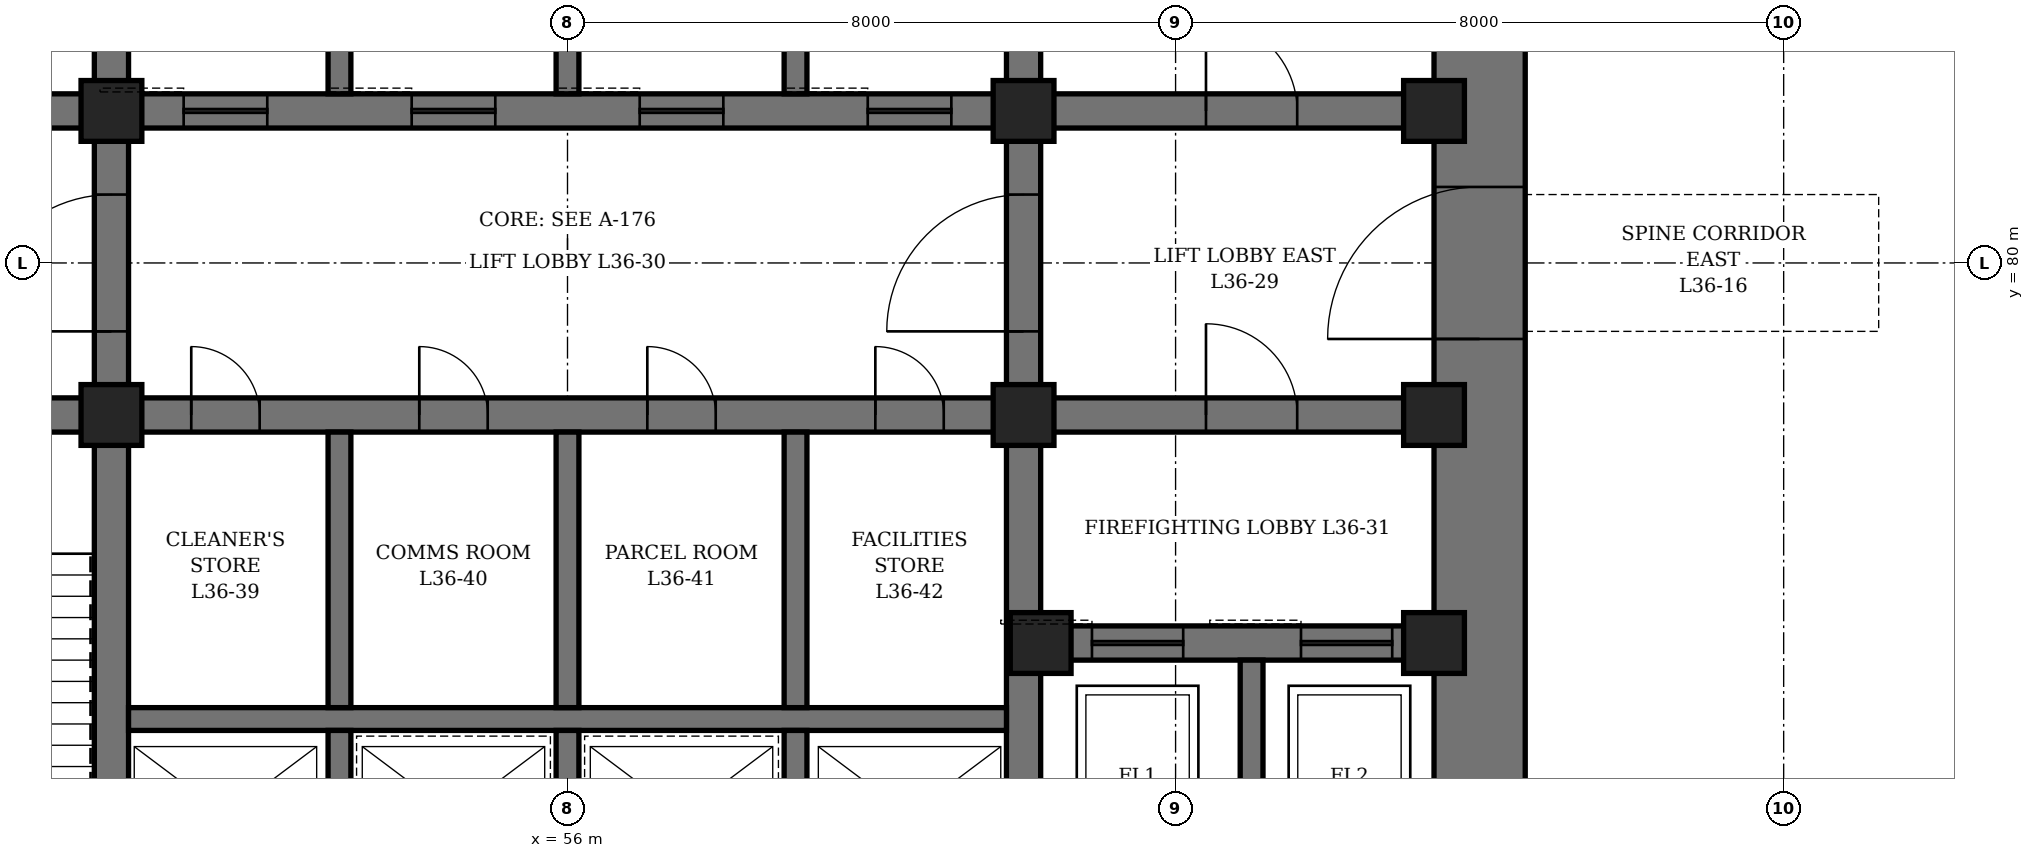
"""IFC4 building model, lengths in metres.
Left out: names, types, materials, properties, quantities, classifications, styles, units other than length and angle.
Written with IfcOpenShell. Run it as: python <this file> out.ifc"""

import sys

from ifc_helpers import new_model, si_unit, direction, frame, frame_2d, origin, origin_2d, place, context, subcontext, project, spatial, rectangle, hollow_rectangle, extrude, element, fill, save


model = new_model("IFC4")
c1 = context("Model", 3, precision=1e-05, world=origin(), true_north=direction((0.0, 1.0)))
c2 = subcontext(c1, "Body", "Model", "MODEL_VIEW")
j1 = project(units=[si_unit("LENGTHUNIT", "METRE"), si_unit("PLANEANGLEUNIT", "RADIAN")], contexts=[c1])
p1 = place(None, origin())
s1 = spatial("IfcSite", under=j1, at=p1, CompositionType="ELEMENT")
p2 = place(p1, origin())
s2 = spatial("IfcBuilding", under=s1, at=p2, CompositionType="ELEMENT")
p3 = place(p2, frame((0.0, 0.0, 162.7)))
s3 = spatial("IfcBuildingStorey", under=s2, at=p3, CompositionType="ELEMENT", Elevation=162.7)
p4 = place(p3, frame((68.0, 70.4, 0.0), z_axis=(0.0, 0.0, 1.0), x_axis=(0.0, 1.0, 0.0)))
e1 = element("IfcWall", 1, at=p4, inside=s3, PredefinedType="SHEAR", context=c2, shape_type="SweptSolid", body=[
    extrude(rectangle(XDim=19.2, YDim=1.2, at=frame_2d((9.6, 0.0))), origin(), (0.0, 0.0, 1.0), 4.2),
])
p5 = place(p4, frame((8.6, 0.0, 0.0)))
e2 = element("IfcOpeningElement", 2, at=p5, cuts=e1, PredefinedType="OPENING", context=c2, shape_type="SweptSolid", body=[
    extrude(rectangle(XDim=2.0, YDim=2.4, at=frame_2d((1.0, 1.2))), frame((0.0, 0.61, 0.0), z_axis=(0.0, -1.0, 0.0), x_axis=(1.0, 0.0, 0.0)), (0.0, 0.0, 1.0), 1.22),
])
p6 = place(p3, frame((50.0, 71.6, 0.0), z_axis=(0.0, 0.0, 1.0), x_axis=(0.0, 1.0, 0.0)))
e3 = element("IfcWall", 3, at=p6, inside=s3, PredefinedType="SHEAR", context=c2, shape_type="SweptSolid", body=[
    extrude(rectangle(XDim=16.8, YDim=0.45, at=frame_2d((8.4, 0.0))), origin(), (0.0, 0.0, 1.0), 4.2),
])
p7 = place(p6, frame((7.5, 0.0, 0.0)))
e4 = element("IfcOpeningElement", 4, at=p7, cuts=e3, PredefinedType="OPENING", context=c2, shape_type="SweptSolid", body=[
    extrude(rectangle(XDim=1.8, YDim=2.4, at=frame_2d((0.9, 1.2))), frame((0.0, 0.235, 0.0), z_axis=(0.0, -1.0, 0.0), x_axis=(1.0, 0.0, 0.0)), (0.0, 0.0, 1.0), 0.47),
])
p8 = place(p3, frame((62.0, 71.6, 0.0), z_axis=(0.0, 0.0, 1.0), x_axis=(0.0, 1.0, 0.0)))
e5 = element("IfcWall", 5, at=p8, inside=s3, PredefinedType="SHEAR", context=c2, shape_type="SweptSolid", body=[
    extrude(rectangle(XDim=16.8, YDim=0.45, at=frame_2d((8.4, 0.0))), origin(), (0.0, 0.0, 1.0), 4.2),
])
p9 = place(p8, frame((7.5, 0.0, 0.0)))
e6 = element("IfcOpeningElement", 6, at=p9, cuts=e5, PredefinedType="OPENING", context=c2, shape_type="SweptSolid", body=[
    extrude(rectangle(XDim=1.8, YDim=2.4, at=frame_2d((0.9, 1.2))), frame((0.0, 0.235, 0.0), z_axis=(0.0, -1.0, 0.0), x_axis=(1.0, 0.0, 0.0)), (0.0, 0.0, 1.0), 0.47),
])
p10 = place(p3, frame((44.6, 78.0, 0.0), z_axis=(0.0, 0.0, 1.0), x_axis=(1.0, 0.0, 0.0)))
e7 = element("IfcWall", 7, at=p10, inside=s3, PredefinedType="SHEAR", context=c2, shape_type="SweptSolid", body=[
    extrude(rectangle(XDim=5.175, YDim=0.45, at=frame_2d((2.587, 0.0))), origin(), (0.0, 0.0, 1.0), 4.2),
])
p11 = place(p10, frame((1.8, 0.0, 0.0)))
e8 = element("IfcOpeningElement", 8, at=p11, cuts=e7, PredefinedType="OPENING", context=c2, shape_type="SweptSolid", body=[
    extrude(rectangle(XDim=1.2, YDim=2.1, at=frame_2d((0.6, 1.05))), frame((0.0, 0.235, 0.0), z_axis=(0.0, -1.0, 0.0), x_axis=(1.0, 0.0, 0.0)), (0.0, 0.0, 1.0), 0.47),
])
p12 = place(p3, frame((44.6, 82.0, 0.0), z_axis=(0.0, 0.0, 1.0), x_axis=(1.0, 0.0, 0.0)))
e9 = element("IfcWall", 9, at=p12, inside=s3, PredefinedType="SHEAR", context=c2, shape_type="SweptSolid", body=[
    extrude(rectangle(XDim=5.175, YDim=0.45, at=frame_2d((2.587, 0.0))), origin(), (0.0, 0.0, 1.0), 4.2),
])
p13 = place(p12, frame((0.7, 0.0, 0.0)))
e10 = element("IfcOpeningElement", 10, at=p13, cuts=e9, PredefinedType="OPENING", context=c2, shape_type="SweptSolid", body=[
    extrude(rectangle(XDim=0.9, YDim=2.1, at=frame_2d((0.45, 1.05))), frame((0.0, 0.235, 0.0), z_axis=(0.0, -1.0, 0.0), x_axis=(1.0, 0.0, 0.0)), (0.0, 0.0, 1.0), 0.47),
])
p14 = place(p3, frame((62.225, 75.0, 0.0), z_axis=(0.0, 0.0, 1.0), x_axis=(1.0, 0.0, 0.0)))
e11 = element("IfcWall", 11, at=p14, inside=s3, PredefinedType="SHEAR", context=c2, shape_type="SweptSolid", body=[
    extrude(rectangle(XDim=5.175, YDim=0.45, at=frame_2d((2.587, 0.0))), origin(), (0.0, 0.0, 1.0), 4.2),
])
p15 = place(p14, frame((0.675, 0.0, 0.0)))
e12 = element("IfcOpeningElement", 12, at=p15, cuts=e11, PredefinedType="OPENING", context=c2, shape_type="SweptSolid", body=[
    extrude(rectangle(XDim=1.2, YDim=2.2, at=frame_2d((0.6, 1.1))), frame((0.0, 0.235, 0.0), z_axis=(0.0, -1.0, 0.0), x_axis=(1.0, 0.0, 0.0)), (0.0, 0.0, 1.0), 0.47),
])
p16 = place(p14, frame((3.425, 0.0, 0.0)))
e13 = element("IfcOpeningElement", 13, at=p16, cuts=e11, PredefinedType="OPENING", context=c2, shape_type="SweptSolid", body=[
    extrude(rectangle(XDim=1.2, YDim=2.2, at=frame_2d((0.6, 1.1))), frame((0.0, 0.235, 0.0), z_axis=(0.0, -1.0, 0.0), x_axis=(1.0, 0.0, 0.0)), (0.0, 0.0, 1.0), 0.47),
])
p17 = place(p3, frame((62.225, 78.0, 0.0), z_axis=(0.0, 0.0, 1.0), x_axis=(1.0, 0.0, 0.0)))
e14 = element("IfcWall", 14, at=p17, inside=s3, PredefinedType="SHEAR", context=c2, shape_type="SweptSolid", body=[
    extrude(rectangle(XDim=5.175, YDim=0.45, at=frame_2d((2.587, 0.0))), origin(), (0.0, 0.0, 1.0), 4.2),
])
p18 = place(p17, frame((2.175, 0.0, 0.0)))
e15 = element("IfcOpeningElement", 15, at=p18, cuts=e14, PredefinedType="OPENING", context=c2, shape_type="SweptSolid", body=[
    extrude(rectangle(XDim=1.2, YDim=2.1, at=frame_2d((0.6, 1.05))), frame((0.0, 0.235, 0.0), z_axis=(0.0, -1.0, 0.0), x_axis=(1.0, 0.0, 0.0)), (0.0, 0.0, 1.0), 0.47),
])
p19 = place(p3, frame((62.225, 82.0, 0.0), z_axis=(0.0, 0.0, 1.0), x_axis=(1.0, 0.0, 0.0)))
e16 = element("IfcWall", 16, at=p19, inside=s3, PredefinedType="SHEAR", context=c2, shape_type="SweptSolid", body=[
    extrude(rectangle(XDim=5.175, YDim=0.45, at=frame_2d((2.587, 0.0))), origin(), (0.0, 0.0, 1.0), 4.2),
])
p20 = place(p19, frame((2.175, 0.0, 0.0)))
e17 = element("IfcOpeningElement", 17, at=p20, cuts=e16, PredefinedType="OPENING", context=c2, shape_type="SweptSolid", body=[
    extrude(rectangle(XDim=1.2, YDim=2.1, at=frame_2d((0.6, 1.05))), frame((0.0, 0.235, 0.0), z_axis=(0.0, -1.0, 0.0), x_axis=(1.0, 0.0, 0.0)), (0.0, 0.0, 1.0), 0.47),
])
p21 = place(p3, frame((50.225, 78.0, 0.0), z_axis=(0.0, 0.0, 1.0), x_axis=(1.0, 0.0, 0.0)))
e18 = element("IfcWall", 18, at=p21, inside=s3, PredefinedType="SHEAR", context=c2, shape_type="SweptSolid", body=[
    extrude(rectangle(XDim=11.55, YDim=0.45, at=frame_2d((5.775, 0.0))), origin(), (0.0, 0.0, 1.0), 4.2),
])
p22 = place(p21, frame((0.825, 0.0, 0.0)))
e19 = element("IfcOpeningElement", 19, at=p22, cuts=e18, PredefinedType="OPENING", context=c2, shape_type="SweptSolid", body=[
    extrude(rectangle(XDim=0.9, YDim=2.1, at=frame_2d((0.45, 1.05))), frame((0.0, 0.235, 0.0), z_axis=(0.0, -1.0, 0.0), x_axis=(1.0, 0.0, 0.0)), (0.0, 0.0, 1.0), 0.47),
])
p23 = place(p21, frame((3.825, 0.0, 0.0)))
e20 = element("IfcOpeningElement", 20, at=p23, cuts=e18, PredefinedType="OPENING", context=c2, shape_type="SweptSolid", body=[
    extrude(rectangle(XDim=0.9, YDim=2.1, at=frame_2d((0.45, 1.05))), frame((0.0, 0.235, 0.0), z_axis=(0.0, -1.0, 0.0), x_axis=(1.0, 0.0, 0.0)), (0.0, 0.0, 1.0), 0.47),
])
p24 = place(p21, frame((6.825, 0.0, 0.0)))
e21 = element("IfcOpeningElement", 21, at=p24, cuts=e18, PredefinedType="OPENING", context=c2, shape_type="SweptSolid", body=[
    extrude(rectangle(XDim=0.9, YDim=2.1, at=frame_2d((0.45, 1.05))), frame((0.0, 0.235, 0.0), z_axis=(0.0, -1.0, 0.0), x_axis=(1.0, 0.0, 0.0)), (0.0, 0.0, 1.0), 0.47),
])
p25 = place(p21, frame((9.825, 0.0, 0.0)))
e22 = element("IfcOpeningElement", 22, at=p25, cuts=e18, PredefinedType="OPENING", context=c2, shape_type="SweptSolid", body=[
    extrude(rectangle(XDim=0.9, YDim=2.1, at=frame_2d((0.45, 1.05))), frame((0.0, 0.235, 0.0), z_axis=(0.0, -1.0, 0.0), x_axis=(1.0, 0.0, 0.0)), (0.0, 0.0, 1.0), 0.47),
])
p26 = place(p3, frame((50.225, 82.0, 0.0), z_axis=(0.0, 0.0, 1.0), x_axis=(1.0, 0.0, 0.0)))
e23 = element("IfcWall", 23, at=p26, inside=s3, PredefinedType="SHEAR", context=c2, shape_type="SweptSolid", body=[
    extrude(rectangle(XDim=11.55, YDim=0.45, at=frame_2d((5.775, 0.0))), origin(), (0.0, 0.0, 1.0), 4.2),
])
p27 = place(p26, frame((0.725, 0.0, 0.0)))
e24 = element("IfcOpeningElement", 24, at=p27, cuts=e23, PredefinedType="OPENING", context=c2, shape_type="SweptSolid", body=[
    extrude(rectangle(XDim=1.1, YDim=2.2, at=frame_2d((0.55, 1.1))), frame((0.0, 0.235, 0.0), z_axis=(0.0, -1.0, 0.0), x_axis=(1.0, 0.0, 0.0)), (0.0, 0.0, 1.0), 0.47),
])
p28 = place(p26, frame((3.725, 0.0, 0.0)))
e25 = element("IfcOpeningElement", 25, at=p28, cuts=e23, PredefinedType="OPENING", context=c2, shape_type="SweptSolid", body=[
    extrude(rectangle(XDim=1.1, YDim=2.2, at=frame_2d((0.55, 1.1))), frame((0.0, 0.235, 0.0), z_axis=(0.0, -1.0, 0.0), x_axis=(1.0, 0.0, 0.0)), (0.0, 0.0, 1.0), 0.47),
])
p29 = place(p26, frame((6.725, 0.0, 0.0)))
e26 = element("IfcOpeningElement", 26, at=p29, cuts=e23, PredefinedType="OPENING", context=c2, shape_type="SweptSolid", body=[
    extrude(rectangle(XDim=1.1, YDim=2.2, at=frame_2d((0.55, 1.1))), frame((0.0, 0.235, 0.0), z_axis=(0.0, -1.0, 0.0), x_axis=(1.0, 0.0, 0.0)), (0.0, 0.0, 1.0), 0.47),
])
p30 = place(p26, frame((9.725, 0.0, 0.0)))
e27 = element("IfcOpeningElement", 27, at=p30, cuts=e23, PredefinedType="OPENING", context=c2, shape_type="SweptSolid", body=[
    extrude(rectangle(XDim=1.1, YDim=2.2, at=frame_2d((0.55, 1.1))), frame((0.0, 0.235, 0.0), z_axis=(0.0, -1.0, 0.0), x_axis=(1.0, 0.0, 0.0)), (0.0, 0.0, 1.0), 0.47),
])
p31 = place(p3, frame((50.225, 74.0, 0.0), z_axis=(0.0, 0.0, 1.0), x_axis=(1.0, 0.0, 0.0)))
e28 = element("IfcWall", 28, at=p31, inside=s3, PredefinedType="SHEAR", context=c2, shape_type="SweptSolid", body=[
    extrude(rectangle(XDim=11.55, YDim=0.3, at=frame_2d((5.775, 0.0))), origin(), (0.0, 0.0, 1.0), 4.2),
])
p32 = place(p3, frame((53.0, 71.6, 0.0), z_axis=(0.0, 0.0, 1.0), x_axis=(0.0, 1.0, 0.0)))
e29 = element("IfcWall", 29, at=p32, inside=s3, PredefinedType="SHEAR", context=c2, shape_type="SweptSolid", body=[
    extrude(rectangle(XDim=2.25, YDim=0.3, at=frame_2d((1.125, 0.0))), origin(), (0.0, 0.0, 1.0), 4.2),
])
p33 = place(p3, frame((53.0, 74.15, 0.0), z_axis=(0.0, 0.0, 1.0), x_axis=(0.0, 1.0, 0.0)))
e30 = element("IfcWall", 30, at=p33, inside=s3, PredefinedType="SHEAR", context=c2, shape_type="SweptSolid", body=[
    extrude(rectangle(XDim=3.625, YDim=0.3, at=frame_2d((1.812, 0.0))), origin(), (0.0, 0.0, 1.0), 4.2),
])
p34 = place(p3, frame((53.0, 82.225, 0.0), z_axis=(0.0, 0.0, 1.0), x_axis=(0.0, 1.0, 0.0)))
e31 = element("IfcWall", 31, at=p34, inside=s3, PredefinedType="SHEAR", context=c2, shape_type="SweptSolid", body=[
    extrude(rectangle(XDim=3.55, YDim=0.3, at=frame_2d((1.775, 0.0))), origin(), (0.0, 0.0, 1.0), 4.2),
])
p35 = place(p3, frame((56.0, 71.6, 0.0), z_axis=(0.0, 0.0, 1.0), x_axis=(0.0, 1.0, 0.0)))
e32 = element("IfcWall", 32, at=p35, inside=s3, PredefinedType="SHEAR", context=c2, shape_type="SweptSolid", body=[
    extrude(rectangle(XDim=2.25, YDim=0.3, at=frame_2d((1.125, 0.0))), origin(), (0.0, 0.0, 1.0), 4.2),
])
p36 = place(p3, frame((56.0, 74.15, 0.0), z_axis=(0.0, 0.0, 1.0), x_axis=(0.0, 1.0, 0.0)))
e33 = element("IfcWall", 33, at=p36, inside=s3, PredefinedType="SHEAR", context=c2, shape_type="SweptSolid", body=[
    extrude(rectangle(XDim=3.625, YDim=0.3, at=frame_2d((1.812, 0.0))), origin(), (0.0, 0.0, 1.0), 4.2),
])
p37 = place(p3, frame((56.0, 82.225, 0.0), z_axis=(0.0, 0.0, 1.0), x_axis=(0.0, 1.0, 0.0)))
e34 = element("IfcWall", 34, at=p37, inside=s3, PredefinedType="SHEAR", context=c2, shape_type="SweptSolid", body=[
    extrude(rectangle(XDim=3.55, YDim=0.3, at=frame_2d((1.775, 0.0))), origin(), (0.0, 0.0, 1.0), 4.2),
])
p38 = place(p3, frame((59.0, 71.6, 0.0), z_axis=(0.0, 0.0, 1.0), x_axis=(0.0, 1.0, 0.0)))
e35 = element("IfcWall", 35, at=p38, inside=s3, PredefinedType="SHEAR", context=c2, shape_type="SweptSolid", body=[
    extrude(rectangle(XDim=2.25, YDim=0.3, at=frame_2d((1.125, 0.0))), origin(), (0.0, 0.0, 1.0), 4.2),
])
p39 = place(p3, frame((59.0, 74.15, 0.0), z_axis=(0.0, 0.0, 1.0), x_axis=(0.0, 1.0, 0.0)))
e36 = element("IfcWall", 36, at=p39, inside=s3, PredefinedType="SHEAR", context=c2, shape_type="SweptSolid", body=[
    extrude(rectangle(XDim=3.625, YDim=0.3, at=frame_2d((1.812, 0.0))), origin(), (0.0, 0.0, 1.0), 4.2),
])
p40 = place(p3, frame((59.0, 82.225, 0.0), z_axis=(0.0, 0.0, 1.0), x_axis=(0.0, 1.0, 0.0)))
e37 = element("IfcWall", 37, at=p40, inside=s3, PredefinedType="SHEAR", context=c2, shape_type="SweptSolid", body=[
    extrude(rectangle(XDim=3.55, YDim=0.3, at=frame_2d((1.775, 0.0))), origin(), (0.0, 0.0, 1.0), 4.2),
])
p41 = place(p3, frame((65.0, 71.6, 0.0), z_axis=(0.0, 0.0, 1.0), x_axis=(0.0, 1.0, 0.0)))
e38 = element("IfcWall", 38, at=p41, inside=s3, PredefinedType="SHEAR", context=c2, shape_type="SweptSolid", body=[
    extrude(rectangle(XDim=3.175, YDim=0.3, at=frame_2d((1.587, 0.0))), origin(), (0.0, 0.0, 1.0), 4.2),
])
for number, where, z_axis, x_axis in (
    (39, (50.0, 78.0, 0.0), (0.0, 0.0, 1.0), (1.0, 0.0, 0.0)),
    (40, (50.0, 82.0, 0.0), (0.0, 0.0, 1.0), (1.0, 0.0, 0.0)),
    (41, (62.0, 78.0, 0.0), (0.0, 0.0, 1.0), (1.0, 0.0, 0.0)),
    (42, (62.0, 82.0, 0.0), (0.0, 0.0, 1.0), (1.0, 0.0, 0.0)),
    (43, (62.225, 75.0, 0.0), (0.0, 0.0, 1.0), (1.0, 0.0, 0.0)),
    (44, (67.4, 75.0, 0.0), (0.0, 0.0, 1.0), (1.0, 0.0, 0.0)),
    (45, (67.4, 78.0, 0.0), (0.0, 0.0, 1.0), (1.0, 0.0, 0.0)),
    (46, (67.4, 82.0, 0.0), (0.0, 0.0, 1.0), (1.0, 0.0, 0.0)),
):
    element("IfcColumn", number, at=place(p3, frame(where, z_axis=z_axis, x_axis=x_axis)), inside=s3, PredefinedType="COLUMN", context=c2, shape_type="SweptSolid", body=[
        extrude(hollow_rectangle(XDim=0.8, YDim=0.8, WallThickness=0.1, at=origin_2d()), origin(), (0.0, 0.0, 1.0), 4.2),
    ])
p42 = place(p22, origin())
e47 = element("IfcDoor", 47, at=p42, inside=s3, OperationType="SINGLE_SWING_LEFT", PredefinedType="DOOR", context=c2, shape_type="SweptSolid", body=[
    extrude(rectangle(XDim=0.9, YDim=2.1, at=frame_2d((0.45, 1.05))), frame((0.0, 0.225, 0.0), z_axis=(0.0, -1.0, 0.0), x_axis=(1.0, 0.0, 0.0)), (0.0, 0.0, 1.0), 0.449),
])
fill(e19, e47)
p43 = place(p23, origin())
e48 = element("IfcDoor", 48, at=p43, inside=s3, OperationType="SINGLE_SWING_LEFT", PredefinedType="DOOR", context=c2, shape_type="SweptSolid", body=[
    extrude(rectangle(XDim=0.9, YDim=2.1, at=frame_2d((0.45, 1.05))), frame((0.0, 0.225, 0.0), z_axis=(0.0, -1.0, 0.0), x_axis=(1.0, 0.0, 0.0)), (0.0, 0.0, 1.0), 0.449),
])
fill(e20, e48)
p44 = place(p24, origin())
e49 = element("IfcDoor", 49, at=p44, inside=s3, OperationType="SINGLE_SWING_LEFT", PredefinedType="DOOR", context=c2, shape_type="SweptSolid", body=[
    extrude(rectangle(XDim=0.9, YDim=2.1, at=frame_2d((0.45, 1.05))), frame((0.0, 0.225, 0.0), z_axis=(0.0, -1.0, 0.0), x_axis=(1.0, 0.0, 0.0)), (0.0, 0.0, 1.0), 0.449),
])
fill(e21, e49)
p45 = place(p25, origin())
e50 = element("IfcDoor", 50, at=p45, inside=s3, OperationType="SINGLE_SWING_LEFT", PredefinedType="DOOR", context=c2, shape_type="SweptSolid", body=[
    extrude(rectangle(XDim=0.9, YDim=2.1, at=frame_2d((0.45, 1.05))), frame((0.0, 0.225, 0.0), z_axis=(0.0, -1.0, 0.0), x_axis=(1.0, 0.0, 0.0)), (0.0, 0.0, 1.0), 0.449),
])
fill(e22, e50)
p46 = place(p20, origin())
e51 = element("IfcDoor", 51, at=p46, inside=s3, OperationType="SINGLE_SWING_LEFT", PredefinedType="DOOR", context=c2, shape_type="SweptSolid", body=[
    extrude(rectangle(XDim=1.2, YDim=2.1, at=frame_2d((0.6, 1.05))), frame((0.0, 0.225, 0.0), z_axis=(0.0, -1.0, 0.0), x_axis=(1.0, 0.0, 0.0)), (0.0, 0.0, 1.0), 0.449),
])
fill(e17, e51)
p47 = place(p5, origin())
e52 = element("IfcDoor", 52, at=p47, inside=s3, OperationType="DOUBLE_DOOR_SINGLE_SWING", PredefinedType="DOOR", context=c2, shape_type="SweptSolid", body=[
    extrude(rectangle(XDim=2.0, YDim=2.4, at=frame_2d((1.0, 1.2))), frame((0.0, 0.35, 0.0), z_axis=(0.0, -1.0, 0.0), x_axis=(1.0, 0.0, 0.0)), (0.0, 0.0, 1.0), 0.7),
])
fill(e2, e52)
p48 = place(p7, origin())
e53 = element("IfcDoor", 53, at=p48, inside=s3, OperationType="DOUBLE_DOOR_SINGLE_SWING", PredefinedType="DOOR", context=c2, shape_type="SweptSolid", body=[
    extrude(rectangle(XDim=1.8, YDim=2.4, at=frame_2d((0.9, 1.2))), frame((0.0, 0.225, 0.0), z_axis=(0.0, -1.0, 0.0), x_axis=(1.0, 0.0, 0.0)), (0.0, 0.0, 1.0), 0.449),
])
fill(e4, e53)
p49 = place(p9, origin())
e54 = element("IfcDoor", 54, at=p49, inside=s3, OperationType="DOUBLE_DOOR_SINGLE_SWING", PredefinedType="DOOR", context=c2, shape_type="SweptSolid", body=[
    extrude(rectangle(XDim=1.8, YDim=2.4, at=frame_2d((0.9, 1.2))), frame((0.0, 0.225, 0.0), z_axis=(0.0, -1.0, 0.0), x_axis=(1.0, 0.0, 0.0)), (0.0, 0.0, 1.0), 0.449),
])
fill(e6, e54)
p50 = place(p18, origin())
e55 = element("IfcDoor", 55, at=p50, inside=s3, OperationType="SINGLE_SWING_RIGHT", PredefinedType="DOOR", context=c2, shape_type="SweptSolid", body=[
    extrude(rectangle(XDim=1.2, YDim=2.1, at=frame_2d((0.6, 1.05))), frame((0.0, 0.225, 0.0), z_axis=(0.0, -1.0, 0.0), x_axis=(1.0, 0.0, 0.0)), (0.0, 0.0, 1.0), 0.449),
])
fill(e15, e55)
p51 = place(p27, origin())
e56 = element("IfcDoor", 56, at=p51, inside=s3, OperationType="SLIDING_TO_LEFT", PredefinedType="DOOR", context=c2, shape_type="SweptSolid", body=[
    extrude(rectangle(XDim=1.1, YDim=2.2, at=frame_2d((0.55, 1.1))), frame((0.0, 0.225, 0.0), z_axis=(0.0, -1.0, 0.0), x_axis=(1.0, 0.0, 0.0)), (0.0, 0.0, 1.0), 0.449),
])
fill(e24, e56)
p52 = place(p28, origin())
e57 = element("IfcDoor", 57, at=p52, inside=s3, OperationType="SLIDING_TO_LEFT", PredefinedType="DOOR", context=c2, shape_type="SweptSolid", body=[
    extrude(rectangle(XDim=1.1, YDim=2.2, at=frame_2d((0.55, 1.1))), frame((0.0, 0.225, 0.0), z_axis=(0.0, -1.0, 0.0), x_axis=(1.0, 0.0, 0.0)), (0.0, 0.0, 1.0), 0.449),
])
fill(e25, e57)
p53 = place(p29, origin())
e58 = element("IfcDoor", 58, at=p53, inside=s3, OperationType="SLIDING_TO_LEFT", PredefinedType="DOOR", context=c2, shape_type="SweptSolid", body=[
    extrude(rectangle(XDim=1.1, YDim=2.2, at=frame_2d((0.55, 1.1))), frame((0.0, 0.225, 0.0), z_axis=(0.0, -1.0, 0.0), x_axis=(1.0, 0.0, 0.0)), (0.0, 0.0, 1.0), 0.449),
])
fill(e26, e58)
p54 = place(p30, origin())
e59 = element("IfcDoor", 59, at=p54, inside=s3, OperationType="SLIDING_TO_LEFT", PredefinedType="DOOR", context=c2, shape_type="SweptSolid", body=[
    extrude(rectangle(XDim=1.1, YDim=2.2, at=frame_2d((0.55, 1.1))), frame((0.0, 0.225, 0.0), z_axis=(0.0, -1.0, 0.0), x_axis=(1.0, 0.0, 0.0)), (0.0, 0.0, 1.0), 0.449),
])
fill(e27, e59)
p55 = place(p15, origin())
e60 = element("IfcDoor", 60, at=p55, inside=s3, OperationType="SLIDING_TO_LEFT", PredefinedType="DOOR", context=c2, shape_type="SweptSolid", body=[
    extrude(rectangle(XDim=1.2, YDim=2.2, at=frame_2d((0.6, 1.1))), frame((0.0, 0.225, 0.0), z_axis=(0.0, -1.0, 0.0), x_axis=(1.0, 0.0, 0.0)), (0.0, 0.0, 1.0), 0.449),
])
fill(e12, e60)
p56 = place(p16, origin())
e61 = element("IfcDoor", 61, at=p56, inside=s3, OperationType="SLIDING_TO_LEFT", PredefinedType="DOOR", context=c2, shape_type="SweptSolid", body=[
    extrude(rectangle(XDim=1.2, YDim=2.2, at=frame_2d((0.6, 1.1))), frame((0.0, 0.225, 0.0), z_axis=(0.0, -1.0, 0.0), x_axis=(1.0, 0.0, 0.0)), (0.0, 0.0, 1.0), 0.449),
])
fill(e13, e61)
save(model, sys.argv[1])
